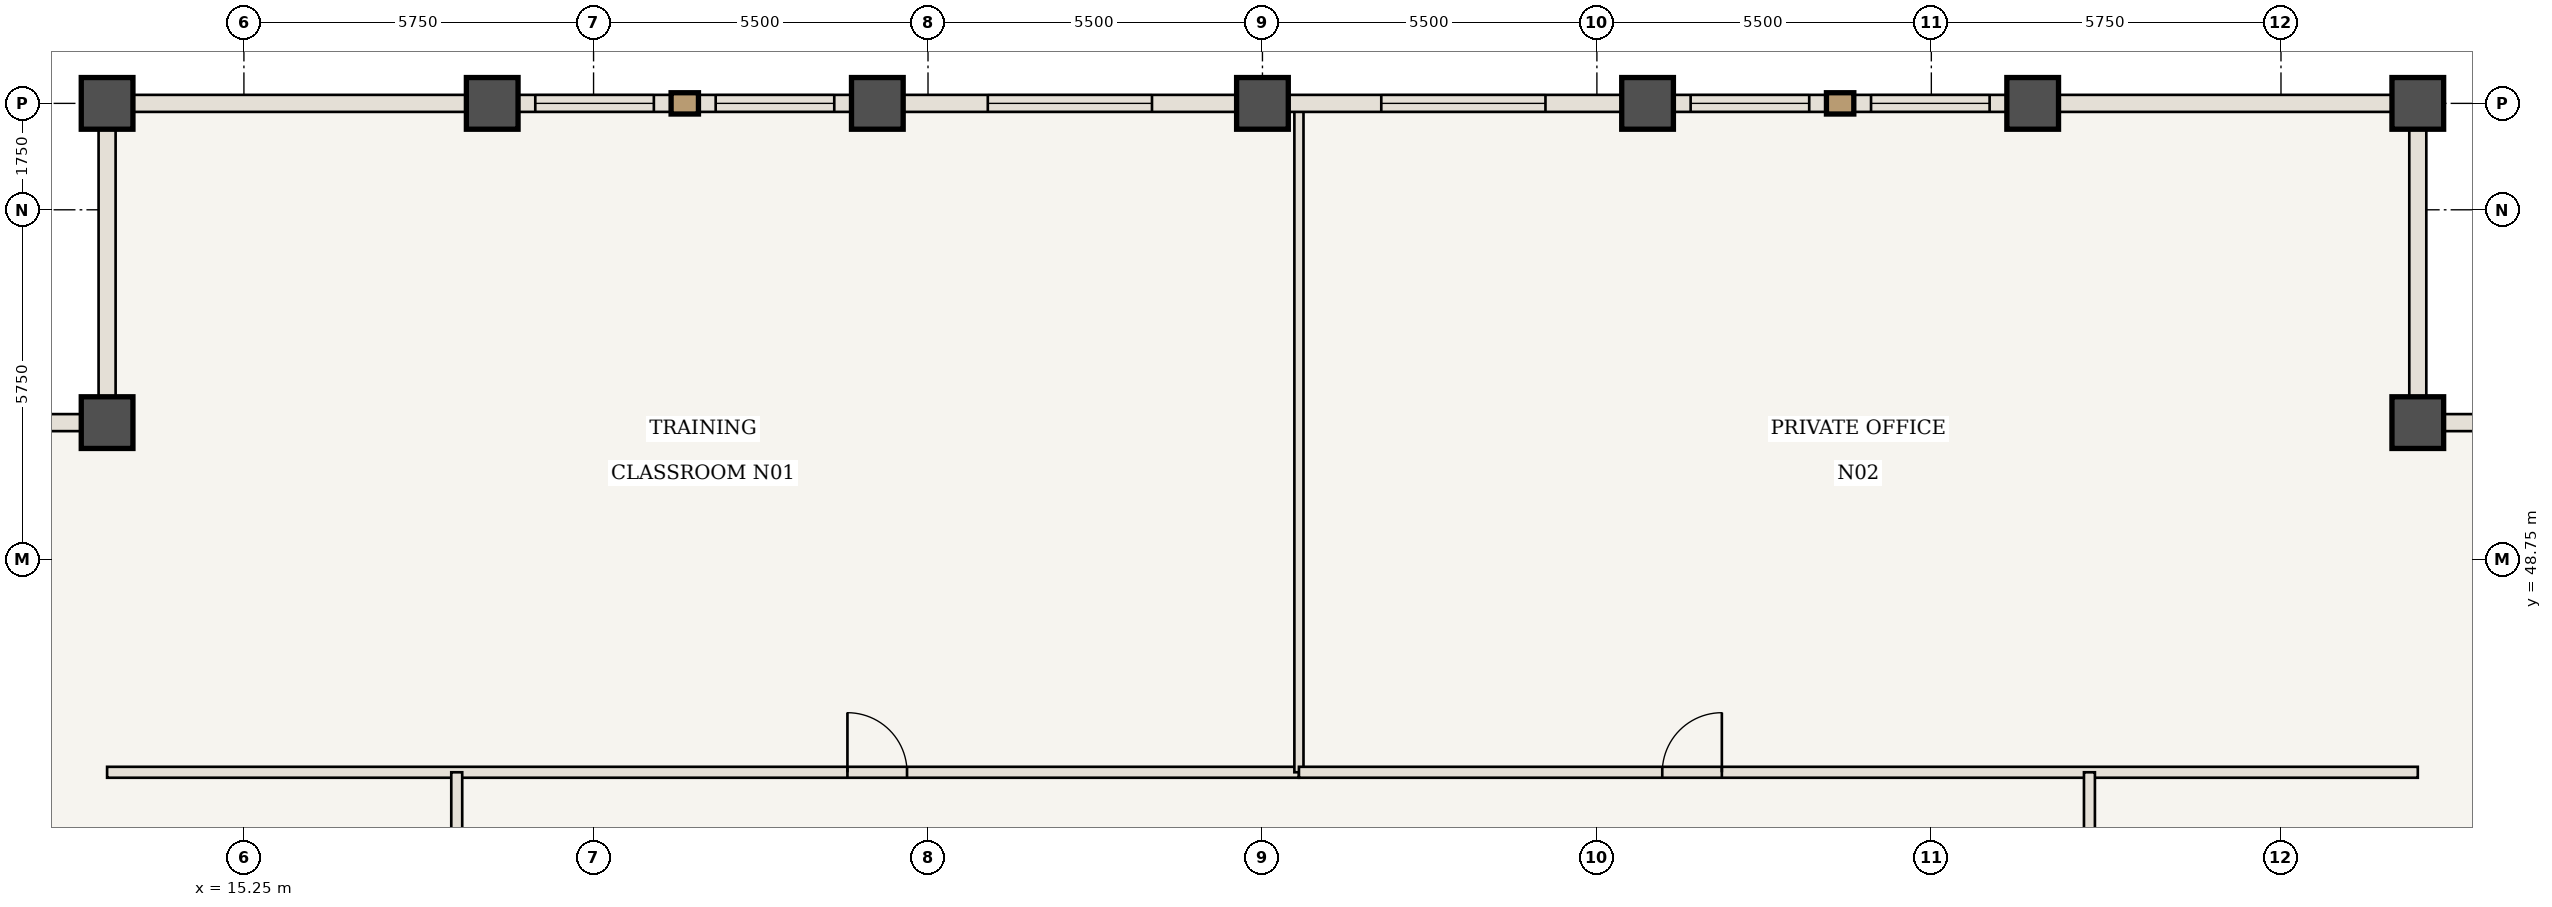
"""IFC4 building model, lengths in metres.
Left out: names, types, materials, properties, quantities, classifications, styles, units other than length and angle.
Written with IfcOpenShell. Run it as: python <this file> out.ifc"""

import sys

from ifc_helpers import new_model, si_unit, direction, frame, frame_2d, origin, origin_2d, place, context, subcontext, project, spatial, rectangle, extrude, element, fill, save


model = new_model("IFC4")
c1 = context("Model", 3, precision=1e-05, world=origin(), true_north=direction((0.0, 1.0)))
c2 = subcontext(c1, "Body", "Model", "MODEL_VIEW")
j1 = project(units=[si_unit("LENGTHUNIT", "METRE"), si_unit("PLANEANGLEUNIT", "RADIAN")], contexts=[c1])
p1 = place(None, origin())
s1 = spatial("IfcSite", under=j1, at=p1, CompositionType="ELEMENT")
p2 = place(p1, origin())
s2 = spatial("IfcBuilding", under=s1, at=p2, CompositionType="ELEMENT")
p3 = place(p2, frame((0.0, 0.0, 240.8)))
s3 = spatial("IfcBuildingStorey", under=s2, at=p3, CompositionType="ELEMENT", Elevation=240.8)
for number, where, z_axis, x_axis in (
    (1, (51.0, 51.0, 0.0), (0.0, 0.0, 1.0), (1.0, 0.0, 0.0)),
    (2, (51.0, 56.25, 0.0), (0.0, 0.0, 1.0), (1.0, 0.0, 0.0)),
    (3, (13.0, 56.25, 0.0), (0.0, 0.0, 1.0), (1.0, 0.0, 0.0)),
    (4, (13.0, 51.0, 0.0), (0.0, 0.0, 1.0), (1.0, 0.0, 0.0)),
    (5, (19.333, 56.25, 0.0), (0.0, 0.0, 1.0), (1.0, 0.0, 0.0)),
    (6, (25.667, 56.25, 0.0), (0.0, 0.0, 1.0), (1.0, 0.0, 0.0)),
    (7, (32.0, 56.25, 0.0), (0.0, 0.0, 1.0), (1.0, 0.0, 0.0)),
    (8, (38.333, 56.25, 0.0), (0.0, 0.0, 1.0), (1.0, 0.0, 0.0)),
    (9, (44.667, 56.25, 0.0), (0.0, 0.0, 1.0), (1.0, 0.0, 0.0)),
):
    element("IfcColumn", number, at=place(p3, frame(where, z_axis=z_axis, x_axis=x_axis)), inside=s3, PredefinedType="COLUMN", context=c2, shape_type="SweptSolid", body=[
        extrude(rectangle(XDim=0.85, YDim=0.85, at=origin_2d()), origin(), (0.0, 0.0, 1.0), 3.85),
    ])
p4 = place(p3, frame((13.0, 45.25, 0.0), z_axis=(0.0, 0.0, 1.0), x_axis=(1.0, 0.0, 0.0)))
e10 = element("IfcWall", 10, at=p4, inside=s3, PredefinedType="STANDARD", context=c2, shape_type="SweptSolid", body=[
    extrude(rectangle(XDim=19.6, YDim=0.18, at=frame_2d((9.8, 0.0))), origin(), (0.0, 0.0, 1.0), 3.685),
])
p5 = place(p4, frame((12.175, 0.0, 0.0)))
e11 = element("IfcOpeningElement", 11, at=p5, cuts=e10, PredefinedType="OPENING", context=c2, shape_type="SweptSolid", body=[
    extrude(rectangle(XDim=0.98, YDim=2.2, at=frame_2d((0.49, 1.1))), frame((0.0, 0.1, 0.0), z_axis=(0.0, -1.0, 0.0), x_axis=(1.0, 0.0, 0.0)), (0.0, 0.0, 1.0), 0.2),
])
p6 = place(p3, frame((32.6, 45.25, 0.0), z_axis=(0.0, 0.0, 1.0), x_axis=(0.0, 1.0, 0.0)))
e12 = element("IfcWall", 12, at=p6, inside=s3, PredefinedType="STANDARD", context=c2, shape_type="SweptSolid", body=[
    extrude(rectangle(XDim=10.94, YDim=0.15, at=frame_2d((5.47, 0.0))), origin(), (0.0, 0.0, 1.0), 3.685),
])
p7 = place(p3, frame((32.6, 45.25, 0.0), z_axis=(0.0, 0.0, 1.0), x_axis=(1.0, 0.0, 0.0)))
e13 = element("IfcWall", 13, at=p7, inside=s3, PredefinedType="STANDARD", context=c2, shape_type="SweptSolid", body=[
    extrude(rectangle(XDim=18.4, YDim=0.18, at=frame_2d((9.2, 0.0))), origin(), (0.0, 0.0, 1.0), 3.685),
])
p8 = place(p7, frame((5.975, 0.0, 0.0)))
e14 = element("IfcOpeningElement", 14, at=p8, cuts=e13, PredefinedType="OPENING", context=c2, shape_type="SweptSolid", body=[
    extrude(rectangle(XDim=0.98, YDim=2.2, at=frame_2d((0.49, 1.1))), frame((0.0, 0.1, 0.0), z_axis=(0.0, -1.0, 0.0), x_axis=(1.0, 0.0, 0.0)), (0.0, 0.0, 1.0), 0.2),
])
p9 = place(p3, frame((18.75, 18.75, 0.0), z_axis=(0.0, 0.0, 1.0), x_axis=(0.0, 1.0, 0.0)))
e15 = element("IfcWall", 15, at=p9, inside=s3, PredefinedType="STANDARD", context=c2, shape_type="SweptSolid", body=[
    extrude(rectangle(XDim=26.5, YDim=0.18, at=frame_2d((13.25, 0.0))), origin(), (0.0, 0.0, 1.0), 3.685),
])
p10 = place(p9, frame((14.2, 0.0, 0.0)))
e16 = element("IfcOpeningElement", 16, at=p10, cuts=e15, PredefinedType="OPENING", context=c2, shape_type="SweptSolid", body=[
    extrude(rectangle(XDim=0.98, YDim=2.2, at=frame_2d((0.49, 1.1))), frame((0.0, 0.1, 0.0), z_axis=(0.0, -1.0, 0.0), x_axis=(1.0, 0.0, 0.0)), (0.0, 0.0, 1.0), 0.2),
])
p11 = place(p3, frame((45.6, 32.7, 0.0), z_axis=(0.0, 0.0, 1.0), x_axis=(0.0, 1.0, 0.0)))
e17 = element("IfcWall", 17, at=p11, inside=s3, PredefinedType="STANDARD", context=c2, shape_type="SweptSolid", body=[
    extrude(rectangle(XDim=12.55, YDim=0.18, at=frame_2d((6.275, 0.0))), origin(), (0.0, 0.0, 1.0), 3.685),
])
p12 = place(p11, frame((5.775, 0.0, 0.0)))
e18 = element("IfcOpeningElement", 18, at=p12, cuts=e17, PredefinedType="OPENING", context=c2, shape_type="SweptSolid", body=[
    extrude(rectangle(XDim=0.98, YDim=2.2, at=frame_2d((0.49, 1.1))), frame((0.0, 0.1, 0.0), z_axis=(0.0, -1.0, 0.0), x_axis=(1.0, 0.0, 0.0)), (0.0, 0.0, 1.0), 0.2),
])
p13 = place(p3, frame((13.0, 56.25, 0.0), z_axis=(0.0, 0.0, 1.0), x_axis=(1.0, 0.0, 0.0)))
e19 = element("IfcWall", 19, at=p13, inside=s3, PredefinedType="USERDEFINED", context=c2, shape_type="SweptSolid", body=[
    extrude(rectangle(XDim=6.333, YDim=0.28, at=frame_2d((3.167, 0.0))), origin(), (0.0, 0.0, 1.0), 2.985),
])
p14 = place(p3, frame((19.333, 56.25, 0.0), z_axis=(0.0, 0.0, 1.0), x_axis=(1.0, 0.0, 0.0)))
e20 = element("IfcWall", 20, at=p14, inside=s3, PredefinedType="USERDEFINED", context=c2, shape_type="SweptSolid", body=[
    extrude(rectangle(XDim=6.333, YDim=0.28, at=frame_2d((3.167, 0.0))), origin(), (0.0, 0.0, 1.0), 2.985),
])
p15 = place(p14, frame((0.708, 0.0, 0.85)))
e21 = element("IfcOpeningElement", 21, at=p15, cuts=e20, PredefinedType="OPENING", context=c2, shape_type="SweptSolid", body=[
    extrude(rectangle(XDim=1.95, YDim=1.935, at=frame_2d((0.975, 0.968))), frame((0.0, 0.15, 0.0), z_axis=(0.0, -1.0, 0.0), x_axis=(1.0, 0.0, 0.0)), (0.0, 0.0, 1.0), 0.3),
])
p16 = place(p14, frame((3.675, 0.0, 0.85)))
e22 = element("IfcOpeningElement", 22, at=p16, cuts=e20, PredefinedType="OPENING", context=c2, shape_type="SweptSolid", body=[
    extrude(rectangle(XDim=1.95, YDim=1.935, at=frame_2d((0.975, 0.968))), frame((0.0, 0.15, 0.0), z_axis=(0.0, -1.0, 0.0), x_axis=(1.0, 0.0, 0.0)), (0.0, 0.0, 1.0), 0.3),
])
p17 = place(p3, frame((25.667, 56.25, 0.0), z_axis=(0.0, 0.0, 1.0), x_axis=(1.0, 0.0, 0.0)))
e23 = element("IfcWall", 23, at=p17, inside=s3, PredefinedType="USERDEFINED", context=c2, shape_type="SweptSolid", body=[
    extrude(rectangle(XDim=6.333, YDim=0.28, at=frame_2d((3.167, 0.0))), origin(), (0.0, 0.0, 1.0), 2.985),
])
p18 = place(p17, frame((1.817, 0.0, 0.85)))
e24 = element("IfcOpeningElement", 24, at=p18, cuts=e23, PredefinedType="OPENING", context=c2, shape_type="SweptSolid", body=[
    extrude(rectangle(XDim=2.7, YDim=1.935, at=frame_2d((1.35, 0.968))), frame((0.0, 0.15, 0.0), z_axis=(0.0, -1.0, 0.0), x_axis=(1.0, 0.0, 0.0)), (0.0, 0.0, 1.0), 0.3),
])
p19 = place(p3, frame((32.0, 56.25, 0.0), z_axis=(0.0, 0.0, 1.0), x_axis=(1.0, 0.0, 0.0)))
e25 = element("IfcWall", 25, at=p19, inside=s3, PredefinedType="USERDEFINED", context=c2, shape_type="SweptSolid", body=[
    extrude(rectangle(XDim=6.333, YDim=0.28, at=frame_2d((3.167, 0.0))), origin(), (0.0, 0.0, 1.0), 2.985),
])
p20 = place(p19, frame((1.954, 0.0, 0.85)))
e26 = element("IfcOpeningElement", 26, at=p20, cuts=e25, PredefinedType="OPENING", context=c2, shape_type="SweptSolid", body=[
    extrude(rectangle(XDim=2.7, YDim=1.935, at=frame_2d((1.35, 0.968))), frame((0.0, 0.15, 0.0), z_axis=(0.0, -1.0, 0.0), x_axis=(1.0, 0.0, 0.0)), (0.0, 0.0, 1.0), 0.3),
])
p21 = place(p3, frame((38.333, 56.25, 0.0), z_axis=(0.0, 0.0, 1.0), x_axis=(1.0, 0.0, 0.0)))
e27 = element("IfcWall", 27, at=p21, inside=s3, PredefinedType="USERDEFINED", context=c2, shape_type="SweptSolid", body=[
    extrude(rectangle(XDim=6.333, YDim=0.28, at=frame_2d((3.167, 0.0))), origin(), (0.0, 0.0, 1.0), 2.985),
])
p22 = place(p21, frame((0.708, 0.0, 0.85)))
e28 = element("IfcOpeningElement", 28, at=p22, cuts=e27, PredefinedType="OPENING", context=c2, shape_type="SweptSolid", body=[
    extrude(rectangle(XDim=1.95, YDim=1.935, at=frame_2d((0.975, 0.968))), frame((0.0, 0.15, 0.0), z_axis=(0.0, -1.0, 0.0), x_axis=(1.0, 0.0, 0.0)), (0.0, 0.0, 1.0), 0.3),
])
p23 = place(p21, frame((3.675, 0.0, 0.85)))
e29 = element("IfcOpeningElement", 29, at=p23, cuts=e27, PredefinedType="OPENING", context=c2, shape_type="SweptSolid", body=[
    extrude(rectangle(XDim=1.95, YDim=1.935, at=frame_2d((0.975, 0.968))), frame((0.0, 0.15, 0.0), z_axis=(0.0, -1.0, 0.0), x_axis=(1.0, 0.0, 0.0)), (0.0, 0.0, 1.0), 0.3),
])
p24 = place(p3, frame((44.667, 56.25, 0.0), z_axis=(0.0, 0.0, 1.0), x_axis=(1.0, 0.0, 0.0)))
e30 = element("IfcWall", 30, at=p24, inside=s3, PredefinedType="USERDEFINED", context=c2, shape_type="SweptSolid", body=[
    extrude(rectangle(XDim=6.333, YDim=0.28, at=frame_2d((3.167, 0.0))), origin(), (0.0, 0.0, 1.0), 2.985),
])
for number, where, z_axis, x_axis in (
    (31, (51.0, 51.0, 0.0), (0.0, 0.0, 1.0), (1.0, 0.0, 0.0)),
    (32, (51.0, 56.25, 0.0), (0.0, 0.0, 1.0), (0.0, -1.0, 0.0)),
    (33, (13.0, 51.0, 0.0), (0.0, 0.0, 1.0), (0.0, 1.0, 0.0)),
    (34, (7.75, 51.0, 0.0), (0.0, 0.0, 1.0), (1.0, 0.0, 0.0)),
):
    element("IfcWall", number, at=place(p3, frame(where, z_axis=z_axis, x_axis=x_axis)), inside=s3, PredefinedType="USERDEFINED", context=c2, shape_type="SweptSolid", body=[
        extrude(rectangle(XDim=5.25, YDim=0.28, at=frame_2d((2.625, 0.0))), origin(), (0.0, 0.0, 1.0), 2.985),
    ])
p25 = place(p5, origin())
e35 = element("IfcDoor", 35, at=p25, inside=s3, OperationType="SINGLE_SWING_LEFT", PredefinedType="DOOR", context=c2, shape_type="SweptSolid", body=[
    extrude(rectangle(XDim=0.98, YDim=2.2, at=frame_2d((0.49, 1.1))), frame((0.0, 0.025, 0.0), z_axis=(0.0, -1.0, 0.0), x_axis=(1.0, 0.0, 0.0)), (0.0, 0.0, 1.0), 0.05),
])
fill(e11, e35)
p26 = place(p8, origin())
e36 = element("IfcDoor", 36, at=p26, inside=s3, OperationType="SINGLE_SWING_RIGHT", PredefinedType="DOOR", context=c2, shape_type="SweptSolid", body=[
    extrude(rectangle(XDim=0.98, YDim=2.2, at=frame_2d((0.49, 1.1))), frame((0.0, 0.025, 0.0), z_axis=(0.0, -1.0, 0.0), x_axis=(1.0, 0.0, 0.0)), (0.0, 0.0, 1.0), 0.05),
])
fill(e14, e36)
p27 = place(p15, origin())
e37 = element("IfcWindow", 37, at=p27, inside=s3, PartitioningType="SINGLE_PANEL", PredefinedType="WINDOW", context=c2, shape_type="SweptSolid", body=[
    extrude(rectangle(XDim=1.95, YDim=1.935, at=frame_2d((0.975, 0.968))), frame((0.0, 0.03, 0.0), z_axis=(0.0, -1.0, 0.0), x_axis=(1.0, 0.0, 0.0)), (0.0, 0.0, 1.0), 0.06),
])
fill(e21, e37)
p28 = place(p16, origin())
e38 = element("IfcWindow", 38, at=p28, inside=s3, PartitioningType="SINGLE_PANEL", PredefinedType="WINDOW", context=c2, shape_type="SweptSolid", body=[
    extrude(rectangle(XDim=1.95, YDim=1.935, at=frame_2d((0.975, 0.968))), frame((0.0, 0.03, 0.0), z_axis=(0.0, -1.0, 0.0), x_axis=(1.0, 0.0, 0.0)), (0.0, 0.0, 1.0), 0.06),
])
fill(e22, e38)
p29 = place(p18, origin())
e39 = element("IfcWindow", 39, at=p29, inside=s3, PartitioningType="SINGLE_PANEL", PredefinedType="WINDOW", context=c2, shape_type="SweptSolid", body=[
    extrude(rectangle(XDim=2.7, YDim=1.935, at=frame_2d((1.35, 0.968))), frame((0.0, 0.03, 0.0), z_axis=(0.0, -1.0, 0.0), x_axis=(1.0, 0.0, 0.0)), (0.0, 0.0, 1.0), 0.06),
])
fill(e24, e39)
p30 = place(p20, origin())
e40 = element("IfcWindow", 40, at=p30, inside=s3, PartitioningType="SINGLE_PANEL", PredefinedType="WINDOW", context=c2, shape_type="SweptSolid", body=[
    extrude(rectangle(XDim=2.7, YDim=1.935, at=frame_2d((1.35, 0.968))), frame((0.0, 0.03, 0.0), z_axis=(0.0, -1.0, 0.0), x_axis=(1.0, 0.0, 0.0)), (0.0, 0.0, 1.0), 0.06),
])
fill(e26, e40)
p31 = place(p22, origin())
e41 = element("IfcWindow", 41, at=p31, inside=s3, PartitioningType="SINGLE_PANEL", PredefinedType="WINDOW", context=c2, shape_type="SweptSolid", body=[
    extrude(rectangle(XDim=1.95, YDim=1.935, at=frame_2d((0.975, 0.968))), frame((0.0, 0.03, 0.0), z_axis=(0.0, -1.0, 0.0), x_axis=(1.0, 0.0, 0.0)), (0.0, 0.0, 1.0), 0.06),
])
fill(e28, e41)
p32 = place(p23, origin())
e42 = element("IfcWindow", 42, at=p32, inside=s3, PartitioningType="SINGLE_PANEL", PredefinedType="WINDOW", context=c2, shape_type="SweptSolid", body=[
    extrude(rectangle(XDim=1.95, YDim=1.935, at=frame_2d((0.975, 0.968))), frame((0.0, 0.03, 0.0), z_axis=(0.0, -1.0, 0.0), x_axis=(1.0, 0.0, 0.0)), (0.0, 0.0, 1.0), 0.06),
])
fill(e29, e42)
save(model, sys.argv[1])
